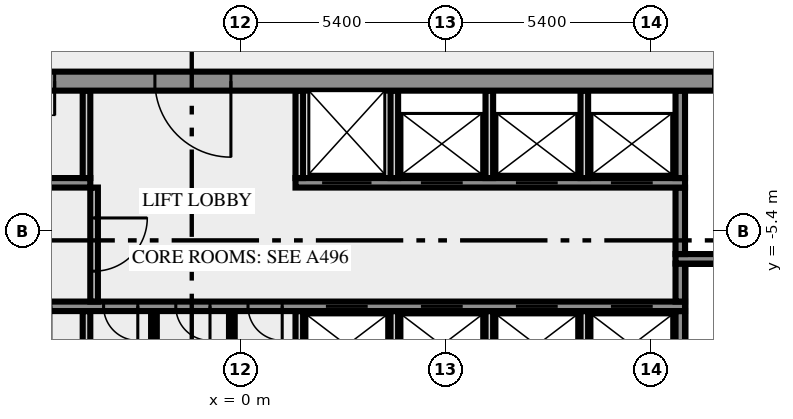
"""IFC4 building model, lengths in metres.
Left out: names, types, materials, properties, quantities, classifications, styles, units other than length and angle.
Written with IfcOpenShell. Run it as: python <this file> out.ifc"""

import sys

from ifc_helpers import new_model, si_unit, direction, frame, frame_2d, origin, place, context, subcontext, project, spatial, rectangle, extrude, element, fill, save


model = new_model("IFC4")
c1 = context("Model", 3, precision=1e-05, world=origin(), true_north=direction((0.0, 1.0)))
c2 = subcontext(c1, "Body", "Model", "MODEL_VIEW")
j1 = project(units=[si_unit("LENGTHUNIT", "METRE"), si_unit("PLANEANGLEUNIT", "RADIAN")], contexts=[c1])
p1 = place(None, origin())
s1 = spatial("IfcSite", under=j1, at=p1, CompositionType="ELEMENT")
p2 = place(p1, origin())
s2 = spatial("IfcBuilding", under=s1, at=p2, CompositionType="ELEMENT")
p3 = place(p2, frame((0.0, 0.0, 218.0)))
s3 = spatial("IfcBuildingStorey", under=s2, at=p3, CompositionType="ELEMENT", Elevation=218.0)
p4 = place(p3, frame((-4.05, -10.5, 0.0), z_axis=(0.0, 0.0, 1.0), x_axis=(0.0, 1.0, 0.0)))
e1 = element("IfcWall", 1, at=p4, inside=s3, PredefinedType="SOLIDWALL", context=c2, shape_type="SweptSolid", body=[
    extrude(rectangle(XDim=3.0, YDim=0.2, at=frame_2d((1.5, 0.0))), origin(), (0.0, 0.0, 1.0), 3.65),
])
for number, where, z_axis, x_axis in (
    (2, (-2.275, -10.5, 0.0), (0.0, 0.0, 1.0), (0.0, 1.0, 0.0)),
    (3, (-0.225, -10.5, 0.0), (0.0, 0.0, 1.0), (0.0, 1.0, 0.0)),
):
    element("IfcWall", number, at=place(p3, frame(where, z_axis=z_axis, x_axis=x_axis)), inside=s3, PredefinedType="PARTITIONING", context=c2, shape_type="SweptSolid", body=[
        extrude(rectangle(XDim=3.0, YDim=0.15, at=frame_2d((1.5, 0.0))), origin(), (0.0, 0.0, 1.0), 3.65),
    ])
for number, where, z_axis, x_axis in (
    (4, (1.55, -10.5, 0.0), (0.0, 0.0, 1.0), (0.0, 1.0, 0.0)),
    (5, (4.05, -10.5, 0.0), (0.0, 0.0, 1.0), (0.0, 1.0, 0.0)),
    (6, (6.55, -10.5, 0.0), (0.0, 0.0, 1.0), (0.0, 1.0, 0.0)),
    (7, (9.05, -10.5, 0.0), (0.0, 0.0, 1.0), (0.0, 1.0, 0.0)),
):
    element("IfcWall", number, at=place(p3, frame(where, z_axis=z_axis, x_axis=x_axis)), inside=s3, PredefinedType="SOLIDWALL", context=c2, shape_type="SweptSolid", body=[
        extrude(rectangle(XDim=3.0, YDim=0.2, at=frame_2d((1.5, 0.0))), origin(), (0.0, 0.0, 1.0), 3.65),
    ])
p5 = place(p3, frame((11.575, -10.5, 0.0), z_axis=(0.0, 0.0, 1.0), x_axis=(0.0, 1.0, 0.0)))
e8 = element("IfcWall", 8, at=p5, inside=s3, PredefinedType="SHEAR", context=c2, shape_type="SweptSolid", body=[
    extrude(rectangle(XDim=3.0, YDim=0.25, at=frame_2d((1.5, 0.0))), origin(), (0.0, 0.0, 1.0), 3.65),
])
p6 = place(p3, frame((11.7, -7.375, 0.0), z_axis=(0.0, 0.0, 1.0), x_axis=(-1.0, 0.0, 0.0)))
e9 = element("IfcWall", 9, at=p6, inside=s3, PredefinedType="SHEAR", context=c2, shape_type="SweptSolid", body=[
    extrude(rectangle(XDim=23.4, YDim=0.25, at=frame_2d((11.7, 0.0))), origin(), (0.0, 0.0, 1.0), 3.65),
])
p7 = place(p6, frame((21.912, 0.0, 0.0)))
e10 = element("IfcOpeningElement", 10, at=p7, cuts=e9, PredefinedType="OPENING", context=c2, shape_type="SweptSolid", body=[
    extrude(rectangle(XDim=0.9, YDim=2.1, at=frame_2d((0.45, 1.05))), frame((0.0, 0.135, 0.0), z_axis=(0.0, -1.0, 0.0), x_axis=(1.0, 0.0, 0.0)), (0.0, 0.0, 1.0), 0.27),
])
p8 = place(p6, frame((19.55, 0.0, 0.0)))
e11 = element("IfcOpeningElement", 11, at=p8, cuts=e9, PredefinedType="OPENING", context=c2, shape_type="SweptSolid", body=[
    extrude(rectangle(XDim=0.9, YDim=2.1, at=frame_2d((0.45, 1.05))), frame((0.0, 0.135, 0.0), z_axis=(0.0, -1.0, 0.0), x_axis=(1.0, 0.0, 0.0)), (0.0, 0.0, 1.0), 0.27),
])
p9 = place(p6, frame((16.688, 0.0, 0.0)))
e12 = element("IfcOpeningElement", 12, at=p9, cuts=e9, PredefinedType="OPENING", context=c2, shape_type="SweptSolid", body=[
    extrude(rectangle(XDim=0.9, YDim=2.1, at=frame_2d((0.45, 1.05))), frame((0.0, 0.135, 0.0), z_axis=(0.0, -1.0, 0.0), x_axis=(1.0, 0.0, 0.0)), (0.0, 0.0, 1.0), 0.27),
])
p10 = place(p6, frame((14.4, 0.0, 0.0)))
e13 = element("IfcOpeningElement", 13, at=p10, cuts=e9, PredefinedType="OPENING", context=c2, shape_type="SweptSolid", body=[
    extrude(rectangle(XDim=0.9, YDim=2.1, at=frame_2d((0.45, 1.05))), frame((0.0, 0.135, 0.0), z_axis=(0.0, -1.0, 0.0), x_axis=(1.0, 0.0, 0.0)), (0.0, 0.0, 1.0), 0.27),
])
p11 = place(p6, frame((12.5, 0.0, 0.0)))
e14 = element("IfcOpeningElement", 14, at=p11, cuts=e9, PredefinedType="OPENING", context=c2, shape_type="SweptSolid", body=[
    extrude(rectangle(XDim=0.9, YDim=2.1, at=frame_2d((0.45, 1.05))), frame((0.0, 0.135, 0.0), z_axis=(0.0, -1.0, 0.0), x_axis=(1.0, 0.0, 0.0)), (0.0, 0.0, 1.0), 0.27),
])
p12 = place(p6, frame((10.6, 0.0, 0.0)))
e15 = element("IfcOpeningElement", 15, at=p12, cuts=e9, PredefinedType="OPENING", context=c2, shape_type="SweptSolid", body=[
    extrude(rectangle(XDim=0.9, YDim=2.1, at=frame_2d((0.45, 1.05))), frame((0.0, 0.135, 0.0), z_axis=(0.0, -1.0, 0.0), x_axis=(1.0, 0.0, 0.0)), (0.0, 0.0, 1.0), 0.27),
])
p13 = place(p6, frame((8.35, 0.0, 0.0)))
e16 = element("IfcOpeningElement", 16, at=p13, cuts=e9, PredefinedType="OPENING", context=c2, shape_type="SweptSolid", body=[
    extrude(rectangle(XDim=1.1, YDim=2.1, at=frame_2d((0.55, 1.05))), frame((0.0, 0.135, 0.0), z_axis=(0.0, -1.0, 0.0), x_axis=(1.0, 0.0, 0.0)), (0.0, 0.0, 1.0), 0.27),
])
p14 = place(p6, frame((5.85, 0.0, 0.0)))
e17 = element("IfcOpeningElement", 17, at=p14, cuts=e9, PredefinedType="OPENING", context=c2, shape_type="SweptSolid", body=[
    extrude(rectangle(XDim=1.1, YDim=2.1, at=frame_2d((0.55, 1.05))), frame((0.0, 0.135, 0.0), z_axis=(0.0, -1.0, 0.0), x_axis=(1.0, 0.0, 0.0)), (0.0, 0.0, 1.0), 0.27),
])
p15 = place(p6, frame((3.35, 0.0, 0.0)))
e18 = element("IfcOpeningElement", 18, at=p15, cuts=e9, PredefinedType="OPENING", context=c2, shape_type="SweptSolid", body=[
    extrude(rectangle(XDim=1.1, YDim=2.1, at=frame_2d((0.55, 1.05))), frame((0.0, 0.135, 0.0), z_axis=(0.0, -1.0, 0.0), x_axis=(1.0, 0.0, 0.0)), (0.0, 0.0, 1.0), 0.27),
])
p16 = place(p6, frame((0.85, 0.0, 0.0)))
e19 = element("IfcOpeningElement", 19, at=p16, cuts=e9, PredefinedType="OPENING", context=c2, shape_type="SweptSolid", body=[
    extrude(rectangle(XDim=1.1, YDim=2.1, at=frame_2d((0.55, 1.05))), frame((0.0, 0.135, 0.0), z_axis=(0.0, -1.0, 0.0), x_axis=(1.0, 0.0, 0.0)), (0.0, 0.0, 1.0), 0.27),
])
p17 = place(p3, frame((-3.85, -4.25, 0.0), z_axis=(0.0, 0.0, 1.0), x_axis=(0.0, -1.0, 0.0)))
e20 = element("IfcWall", 20, at=p17, inside=s3, PredefinedType="SOLIDWALL", context=c2, shape_type="SweptSolid", body=[
    extrude(rectangle(XDim=3.0, YDim=0.2, at=frame_2d((1.5, 0.0))), origin(), (0.0, 0.0, 1.0), 3.65),
])
p18 = place(p17, frame((0.8, 0.0, 0.0)))
e21 = element("IfcOpeningElement", 21, at=p18, cuts=e20, PredefinedType="OPENING", context=c2, shape_type="SweptSolid", body=[
    extrude(rectangle(XDim=1.4, YDim=2.1, at=frame_2d((0.7, 1.05))), frame((0.0, 0.11, 0.0), z_axis=(0.0, -1.0, 0.0), x_axis=(1.0, 0.0, 0.0)), (0.0, 0.0, 1.0), 0.22),
])
p19 = place(p3, frame((11.575, -7.25, 0.0), z_axis=(0.0, 0.0, 1.0), x_axis=(0.0, 1.0, 0.0)))
e22 = element("IfcWall", 22, at=p19, inside=s3, PredefinedType="SHEAR", context=c2, shape_type="SweptSolid", body=[
    extrude(rectangle(XDim=1.0, YDim=0.25, at=frame_2d((0.5, 0.0))), origin(), (0.0, 0.0, 1.0), 3.65),
])
p20 = place(p3, frame((19.5, -6.125, 0.0), z_axis=(0.0, 0.0, 1.0), x_axis=(-1.0, 0.0, 0.0)))
e23 = element("IfcWall", 23, at=p20, inside=s3, PredefinedType="SHEAR", context=c2, shape_type="SweptSolid", body=[
    extrude(rectangle(XDim=8.05, YDim=0.25, at=frame_2d((4.025, 0.0))), origin(), (0.0, 0.0, 1.0), 3.65),
])
p21 = place(p20, frame((0.05, 0.0, 0.0)))
e24 = element("IfcOpeningElement", 24, at=p21, cuts=e23, PredefinedType="OPENING", context=c2, shape_type="SweptSolid", body=[
    extrude(rectangle(XDim=1.8, YDim=2.1, at=frame_2d((0.9, 1.05))), frame((0.0, 0.135, 0.0), z_axis=(0.0, -1.0, 0.0), x_axis=(1.0, 0.0, 0.0)), (0.0, 0.0, 1.0), 0.27),
])
p22 = place(p3, frame((11.575, -6.0, 0.0), z_axis=(0.0, 0.0, 1.0), x_axis=(0.0, 1.0, 0.0)))
e25 = element("IfcWall", 25, at=p22, inside=s3, PredefinedType="SHEAR", context=c2, shape_type="SweptSolid", body=[
    extrude(rectangle(XDim=1.75, YDim=0.25, at=frame_2d((0.875, 0.0))), origin(), (0.0, 0.0, 1.0), 3.65),
])
p23 = place(p3, frame((-11.7, -4.125, 0.0), z_axis=(0.0, 0.0, 1.0), x_axis=(1.0, 0.0, 0.0)))
e26 = element("IfcWall", 26, at=p23, inside=s3, PredefinedType="SHEAR", context=c2, shape_type="SweptSolid", body=[
    extrude(rectangle(XDim=7.75, YDim=0.25, at=frame_2d((3.875, 0.0))), origin(), (0.0, 0.0, 1.0), 3.65),
])
p24 = place(p3, frame((1.45, -4.125, 0.0), z_axis=(0.0, 0.0, 1.0), x_axis=(1.0, 0.0, 0.0)))
e27 = element("IfcWall", 27, at=p24, inside=s3, PredefinedType="SHEAR", context=c2, shape_type="SweptSolid", body=[
    extrude(rectangle(XDim=10.25, YDim=0.25, at=frame_2d((5.125, 0.0))), origin(), (0.0, 0.0, 1.0), 3.65),
])
p25 = place(p24, frame((0.7, 0.0, 0.0)))
e28 = element("IfcOpeningElement", 28, at=p25, cuts=e27, PredefinedType="OPENING", context=c2, shape_type="SweptSolid", body=[
    extrude(rectangle(XDim=1.3, YDim=2.1, at=frame_2d((0.65, 1.05))), frame((0.0, 0.135, 0.0), z_axis=(0.0, -1.0, 0.0), x_axis=(1.0, 0.0, 0.0)), (0.0, 0.0, 1.0), 0.27),
])
p26 = place(p24, frame((3.3, 0.0, 0.0)))
e29 = element("IfcOpeningElement", 29, at=p26, cuts=e27, PredefinedType="OPENING", context=c2, shape_type="SweptSolid", body=[
    extrude(rectangle(XDim=1.1, YDim=2.1, at=frame_2d((0.55, 1.05))), frame((0.0, 0.135, 0.0), z_axis=(0.0, -1.0, 0.0), x_axis=(1.0, 0.0, 0.0)), (0.0, 0.0, 1.0), 0.27),
])
p27 = place(p24, frame((5.8, 0.0, 0.0)))
e30 = element("IfcOpeningElement", 30, at=p27, cuts=e27, PredefinedType="OPENING", context=c2, shape_type="SweptSolid", body=[
    extrude(rectangle(XDim=1.1, YDim=2.1, at=frame_2d((0.55, 1.05))), frame((0.0, 0.135, 0.0), z_axis=(0.0, -1.0, 0.0), x_axis=(1.0, 0.0, 0.0)), (0.0, 0.0, 1.0), 0.27),
])
p28 = place(p24, frame((8.3, 0.0, 0.0)))
e31 = element("IfcOpeningElement", 31, at=p28, cuts=e27, PredefinedType="OPENING", context=c2, shape_type="SweptSolid", body=[
    extrude(rectangle(XDim=1.1, YDim=2.1, at=frame_2d((0.55, 1.05))), frame((0.0, 0.135, 0.0), z_axis=(0.0, -1.0, 0.0), x_axis=(1.0, 0.0, 0.0)), (0.0, 0.0, 1.0), 0.27),
])
for number, where, z_axis, x_axis in (
    (32, (-4.05, -4.0, 0.0), (0.0, 0.0, 1.0), (0.0, 1.0, 0.0)),
    (33, (1.55, -4.0, 0.0), (0.0, 0.0, 1.0), (0.0, 1.0, 0.0)),
    (34, (4.05, -4.0, 0.0), (0.0, 0.0, 1.0), (0.0, 1.0, 0.0)),
    (35, (6.55, -4.0, 0.0), (0.0, 0.0, 1.0), (0.0, 1.0, 0.0)),
    (36, (9.05, -4.0, 0.0), (0.0, 0.0, 1.0), (0.0, 1.0, 0.0)),
):
    element("IfcWall", number, at=place(p3, frame(where, z_axis=z_axis, x_axis=x_axis)), inside=s3, PredefinedType="SOLIDWALL", context=c2, shape_type="SweptSolid", body=[
        extrude(rectangle(XDim=2.3, YDim=0.2, at=frame_2d((1.15, 0.0))), origin(), (0.0, 0.0, 1.0), 3.65),
    ])
p29 = place(p3, frame((11.575, -4.0, 0.0), z_axis=(0.0, 0.0, 1.0), x_axis=(0.0, 1.0, 0.0)))
e37 = element("IfcWall", 37, at=p29, inside=s3, PredefinedType="SHEAR", context=c2, shape_type="SweptSolid", body=[
    extrude(rectangle(XDim=2.3, YDim=0.25, at=frame_2d((1.15, 0.0))), origin(), (0.0, 0.0, 1.0), 3.65),
])
p30 = place(p3, frame((20.49, -1.45, 0.0), z_axis=(0.0, 0.0, 1.0), x_axis=(-1.0, 0.0, 0.0)))
e38 = element("IfcWall", 38, at=p30, inside=s3, PredefinedType="SHEAR", context=c2, shape_type="SweptSolid", body=[
    extrude(rectangle(XDim=40.98, YDim=0.5, at=frame_2d((20.49, 0.0))), origin(), (0.0, 0.0, 1.0), 3.65),
])
p31 = place(p30, frame((38.14, 0.0, 0.0)))
e39 = element("IfcOpeningElement", 39, at=p31, cuts=e38, PredefinedType="OPENING", context=c2, shape_type="SweptSolid", body=[
    extrude(rectangle(XDim=1.8, YDim=2.1, at=frame_2d((0.9, 1.05))), frame((0.0, 0.26, 0.0), z_axis=(0.0, -1.0, 0.0), x_axis=(1.0, 0.0, 0.0)), (0.0, 0.0, 1.0), 0.52),
])
p32 = place(p30, frame((36.728, 0.0, 0.0)))
e40 = element("IfcOpeningElement", 40, at=p32, cuts=e38, PredefinedType="OPENING", context=c2, shape_type="SweptSolid", body=[
    extrude(rectangle(XDim=0.8, YDim=2.1, at=frame_2d((0.4, 1.05))), frame((0.0, 0.26, 0.0), z_axis=(0.0, -1.0, 0.0), x_axis=(1.0, 0.0, 0.0)), (0.0, 0.0, 1.0), 0.52),
])
p33 = place(p30, frame((35.153, 0.0, 0.0)))
e41 = element("IfcOpeningElement", 41, at=p33, cuts=e38, PredefinedType="OPENING", context=c2, shape_type="SweptSolid", body=[
    extrude(rectangle(XDim=0.8, YDim=2.1, at=frame_2d((0.4, 1.05))), frame((0.0, 0.26, 0.0), z_axis=(0.0, -1.0, 0.0), x_axis=(1.0, 0.0, 0.0)), (0.0, 0.0, 1.0), 0.52),
])
p34 = place(p30, frame((32.94, 0.0, 0.0)))
e42 = element("IfcOpeningElement", 42, at=p34, cuts=e38, PredefinedType="OPENING", context=c2, shape_type="SweptSolid", body=[
    extrude(rectangle(XDim=0.9, YDim=2.1, at=frame_2d((0.45, 1.05))), frame((0.0, 0.26, 0.0), z_axis=(0.0, -1.0, 0.0), x_axis=(1.0, 0.0, 0.0)), (0.0, 0.0, 1.0), 0.52),
])
p35 = place(p30, frame((30.202, 0.0, 0.0)))
e43 = element("IfcOpeningElement", 43, at=p35, cuts=e38, PredefinedType="OPENING", context=c2, shape_type="SweptSolid", body=[
    extrude(rectangle(XDim=0.9, YDim=2.1, at=frame_2d((0.45, 1.05))), frame((0.0, 0.26, 0.0), z_axis=(0.0, -1.0, 0.0), x_axis=(1.0, 0.0, 0.0)), (0.0, 0.0, 1.0), 0.52),
])
p36 = place(p30, frame((27.74, 0.0, 0.0)))
e44 = element("IfcOpeningElement", 44, at=p36, cuts=e38, PredefinedType="OPENING", context=c2, shape_type="SweptSolid", body=[
    extrude(rectangle(XDim=0.9, YDim=2.1, at=frame_2d((0.45, 1.05))), frame((0.0, 0.26, 0.0), z_axis=(0.0, -1.0, 0.0), x_axis=(1.0, 0.0, 0.0)), (0.0, 0.0, 1.0), 0.52),
])
p37 = place(p30, frame((25.377, 0.0, 0.0)))
e45 = element("IfcOpeningElement", 45, at=p37, cuts=e38, PredefinedType="OPENING", context=c2, shape_type="SweptSolid", body=[
    extrude(rectangle(XDim=0.9, YDim=2.1, at=frame_2d((0.45, 1.05))), frame((0.0, 0.26, 0.0), z_axis=(0.0, -1.0, 0.0), x_axis=(1.0, 0.0, 0.0)), (0.0, 0.0, 1.0), 0.52),
])
p38 = place(p30, frame((20.74, 0.0, 0.0)))
e46 = element("IfcOpeningElement", 46, at=p38, cuts=e38, PredefinedType="OPENING", context=c2, shape_type="SweptSolid", body=[
    extrude(rectangle(XDim=2.0, YDim=2.1, at=frame_2d((1.0, 1.05))), frame((0.0, 0.26, 0.0), z_axis=(0.0, -1.0, 0.0), x_axis=(1.0, 0.0, 0.0)), (0.0, 0.0, 1.0), 0.52),
])
p39 = place(p30, frame((7.14, 0.0, 0.0)))
e47 = element("IfcOpeningElement", 47, at=p39, cuts=e38, PredefinedType="OPENING", context=c2, shape_type="SweptSolid", body=[
    extrude(rectangle(XDim=0.9, YDim=2.1, at=frame_2d((0.45, 1.05))), frame((0.0, 0.26, 0.0), z_axis=(0.0, -1.0, 0.0), x_axis=(1.0, 0.0, 0.0)), (0.0, 0.0, 1.0), 0.52),
])
p40 = place(p30, frame((4.19, 0.0, 0.0)))
e48 = element("IfcOpeningElement", 48, at=p40, cuts=e38, PredefinedType="OPENING", context=c2, shape_type="SweptSolid", body=[
    extrude(rectangle(XDim=0.9, YDim=2.1, at=frame_2d((0.45, 1.05))), frame((0.0, 0.26, 0.0), z_axis=(0.0, -1.0, 0.0), x_axis=(1.0, 0.0, 0.0)), (0.0, 0.0, 1.0), 0.52),
])
p41 = place(p30, frame((1.04, 0.0, 0.0)))
e49 = element("IfcOpeningElement", 49, at=p41, cuts=e38, PredefinedType="OPENING", context=c2, shape_type="SweptSolid", body=[
    extrude(rectangle(XDim=1.8, YDim=2.1, at=frame_2d((0.9, 1.05))), frame((0.0, 0.26, 0.0), z_axis=(0.0, -1.0, 0.0), x_axis=(1.0, 0.0, 0.0)), (0.0, 0.0, 1.0), 0.52),
])
p42 = place(p10, origin())
e50 = element("IfcDoor", 50, at=p42, inside=s3, OperationType="SINGLE_SWING_RIGHT", PredefinedType="DOOR", context=c2, shape_type="SweptSolid", body=[
    extrude(rectangle(XDim=0.9, YDim=2.1, at=frame_2d((0.45, 1.05))), frame((0.0, 0.025, 0.0), z_axis=(0.0, -1.0, 0.0), x_axis=(1.0, 0.0, 0.0)), (0.0, 0.0, 1.0), 0.05),
])
fill(e13, e50)
p43 = place(p11, origin())
e51 = element("IfcDoor", 51, at=p43, inside=s3, OperationType="SINGLE_SWING_RIGHT", PredefinedType="DOOR", context=c2, shape_type="SweptSolid", body=[
    extrude(rectangle(XDim=0.9, YDim=2.1, at=frame_2d((0.45, 1.05))), frame((0.0, 0.025, 0.0), z_axis=(0.0, -1.0, 0.0), x_axis=(1.0, 0.0, 0.0)), (0.0, 0.0, 1.0), 0.05),
])
fill(e14, e51)
p44 = place(p12, origin())
e52 = element("IfcDoor", 52, at=p44, inside=s3, OperationType="SINGLE_SWING_LEFT", PredefinedType="DOOR", context=c2, shape_type="SweptSolid", body=[
    extrude(rectangle(XDim=0.9, YDim=2.1, at=frame_2d((0.45, 1.05))), frame((0.0, 0.025, 0.0), z_axis=(0.0, -1.0, 0.0), x_axis=(1.0, 0.0, 0.0)), (0.0, 0.0, 1.0), 0.05),
])
fill(e15, e52)
p45 = place(p13, origin())
e53 = element("IfcDoor", 53, at=p45, inside=s3, OperationType="DOUBLE_DOOR_SLIDING", PredefinedType="DOOR", context=c2, shape_type="SweptSolid", body=[
    extrude(rectangle(XDim=1.1, YDim=2.1, at=frame_2d((0.55, 1.05))), frame((0.0, 0.025, 0.0), z_axis=(0.0, -1.0, 0.0), x_axis=(1.0, 0.0, 0.0)), (0.0, 0.0, 1.0), 0.05),
])
fill(e16, e53)
p46 = place(p14, origin())
e54 = element("IfcDoor", 54, at=p46, inside=s3, OperationType="DOUBLE_DOOR_SLIDING", PredefinedType="DOOR", context=c2, shape_type="SweptSolid", body=[
    extrude(rectangle(XDim=1.1, YDim=2.1, at=frame_2d((0.55, 1.05))), frame((0.0, 0.025, 0.0), z_axis=(0.0, -1.0, 0.0), x_axis=(1.0, 0.0, 0.0)), (0.0, 0.0, 1.0), 0.05),
])
fill(e17, e54)
p47 = place(p15, origin())
e55 = element("IfcDoor", 55, at=p47, inside=s3, OperationType="DOUBLE_DOOR_SLIDING", PredefinedType="DOOR", context=c2, shape_type="SweptSolid", body=[
    extrude(rectangle(XDim=1.1, YDim=2.1, at=frame_2d((0.55, 1.05))), frame((0.0, 0.025, 0.0), z_axis=(0.0, -1.0, 0.0), x_axis=(1.0, 0.0, 0.0)), (0.0, 0.0, 1.0), 0.05),
])
fill(e18, e55)
p48 = place(p16, origin())
e56 = element("IfcDoor", 56, at=p48, inside=s3, OperationType="DOUBLE_DOOR_SLIDING", PredefinedType="DOOR", context=c2, shape_type="SweptSolid", body=[
    extrude(rectangle(XDim=1.1, YDim=2.1, at=frame_2d((0.55, 1.05))), frame((0.0, 0.025, 0.0), z_axis=(0.0, -1.0, 0.0), x_axis=(1.0, 0.0, 0.0)), (0.0, 0.0, 1.0), 0.05),
])
fill(e19, e56)
p49 = place(p18, origin())
e57 = element("IfcDoor", 57, at=p49, inside=s3, OperationType="DOUBLE_DOOR_SINGLE_SWING", PredefinedType="DOOR", context=c2, shape_type="SweptSolid", body=[
    extrude(rectangle(XDim=1.4, YDim=2.1, at=frame_2d((0.7, 1.05))), frame((0.0, 0.025, 0.0), z_axis=(0.0, -1.0, 0.0), x_axis=(1.0, 0.0, 0.0)), (0.0, 0.0, 1.0), 0.05),
])
fill(e21, e57)
p50 = place(p25, origin())
e58 = element("IfcDoor", 58, at=p50, inside=s3, OperationType="DOUBLE_DOOR_SLIDING", PredefinedType="DOOR", context=c2, shape_type="SweptSolid", body=[
    extrude(rectangle(XDim=1.3, YDim=2.1, at=frame_2d((0.65, 1.05))), frame((0.0, 0.025, 0.0), z_axis=(0.0, -1.0, 0.0), x_axis=(1.0, 0.0, 0.0)), (0.0, 0.0, 1.0), 0.05),
])
fill(e28, e58)
p51 = place(p26, origin())
e59 = element("IfcDoor", 59, at=p51, inside=s3, OperationType="DOUBLE_DOOR_SLIDING", PredefinedType="DOOR", context=c2, shape_type="SweptSolid", body=[
    extrude(rectangle(XDim=1.1, YDim=2.1, at=frame_2d((0.55, 1.05))), frame((0.0, 0.025, 0.0), z_axis=(0.0, -1.0, 0.0), x_axis=(1.0, 0.0, 0.0)), (0.0, 0.0, 1.0), 0.05),
])
fill(e29, e59)
p52 = place(p27, origin())
e60 = element("IfcDoor", 60, at=p52, inside=s3, OperationType="DOUBLE_DOOR_SLIDING", PredefinedType="DOOR", context=c2, shape_type="SweptSolid", body=[
    extrude(rectangle(XDim=1.1, YDim=2.1, at=frame_2d((0.55, 1.05))), frame((0.0, 0.025, 0.0), z_axis=(0.0, -1.0, 0.0), x_axis=(1.0, 0.0, 0.0)), (0.0, 0.0, 1.0), 0.05),
])
fill(e30, e60)
p53 = place(p28, origin())
e61 = element("IfcDoor", 61, at=p53, inside=s3, OperationType="DOUBLE_DOOR_SLIDING", PredefinedType="DOOR", context=c2, shape_type="SweptSolid", body=[
    extrude(rectangle(XDim=1.1, YDim=2.1, at=frame_2d((0.55, 1.05))), frame((0.0, 0.025, 0.0), z_axis=(0.0, -1.0, 0.0), x_axis=(1.0, 0.0, 0.0)), (0.0, 0.0, 1.0), 0.05),
])
fill(e31, e61)
p54 = place(p37, origin())
e62 = element("IfcDoor", 62, at=p54, inside=s3, OperationType="SINGLE_SWING_RIGHT", PredefinedType="DOOR", context=c2, shape_type="SweptSolid", body=[
    extrude(rectangle(XDim=0.9, YDim=2.1, at=frame_2d((0.45, 1.05))), frame((0.0, 0.025, 0.0), z_axis=(0.0, -1.0, 0.0), x_axis=(1.0, 0.0, 0.0)), (0.0, 0.0, 1.0), 0.05),
])
fill(e45, e62)
p55 = place(p38, origin())
e63 = element("IfcDoor", 63, at=p55, inside=s3, OperationType="DOUBLE_DOOR_SINGLE_SWING", PredefinedType="DOOR", context=c2, shape_type="SweptSolid", body=[
    extrude(rectangle(XDim=2.0, YDim=2.1, at=frame_2d((1.0, 1.05))), frame((0.0, 0.025, 0.0), z_axis=(0.0, -1.0, 0.0), x_axis=(1.0, 0.0, 0.0)), (0.0, 0.0, 1.0), 0.05),
])
fill(e46, e63)
save(model, sys.argv[1])
